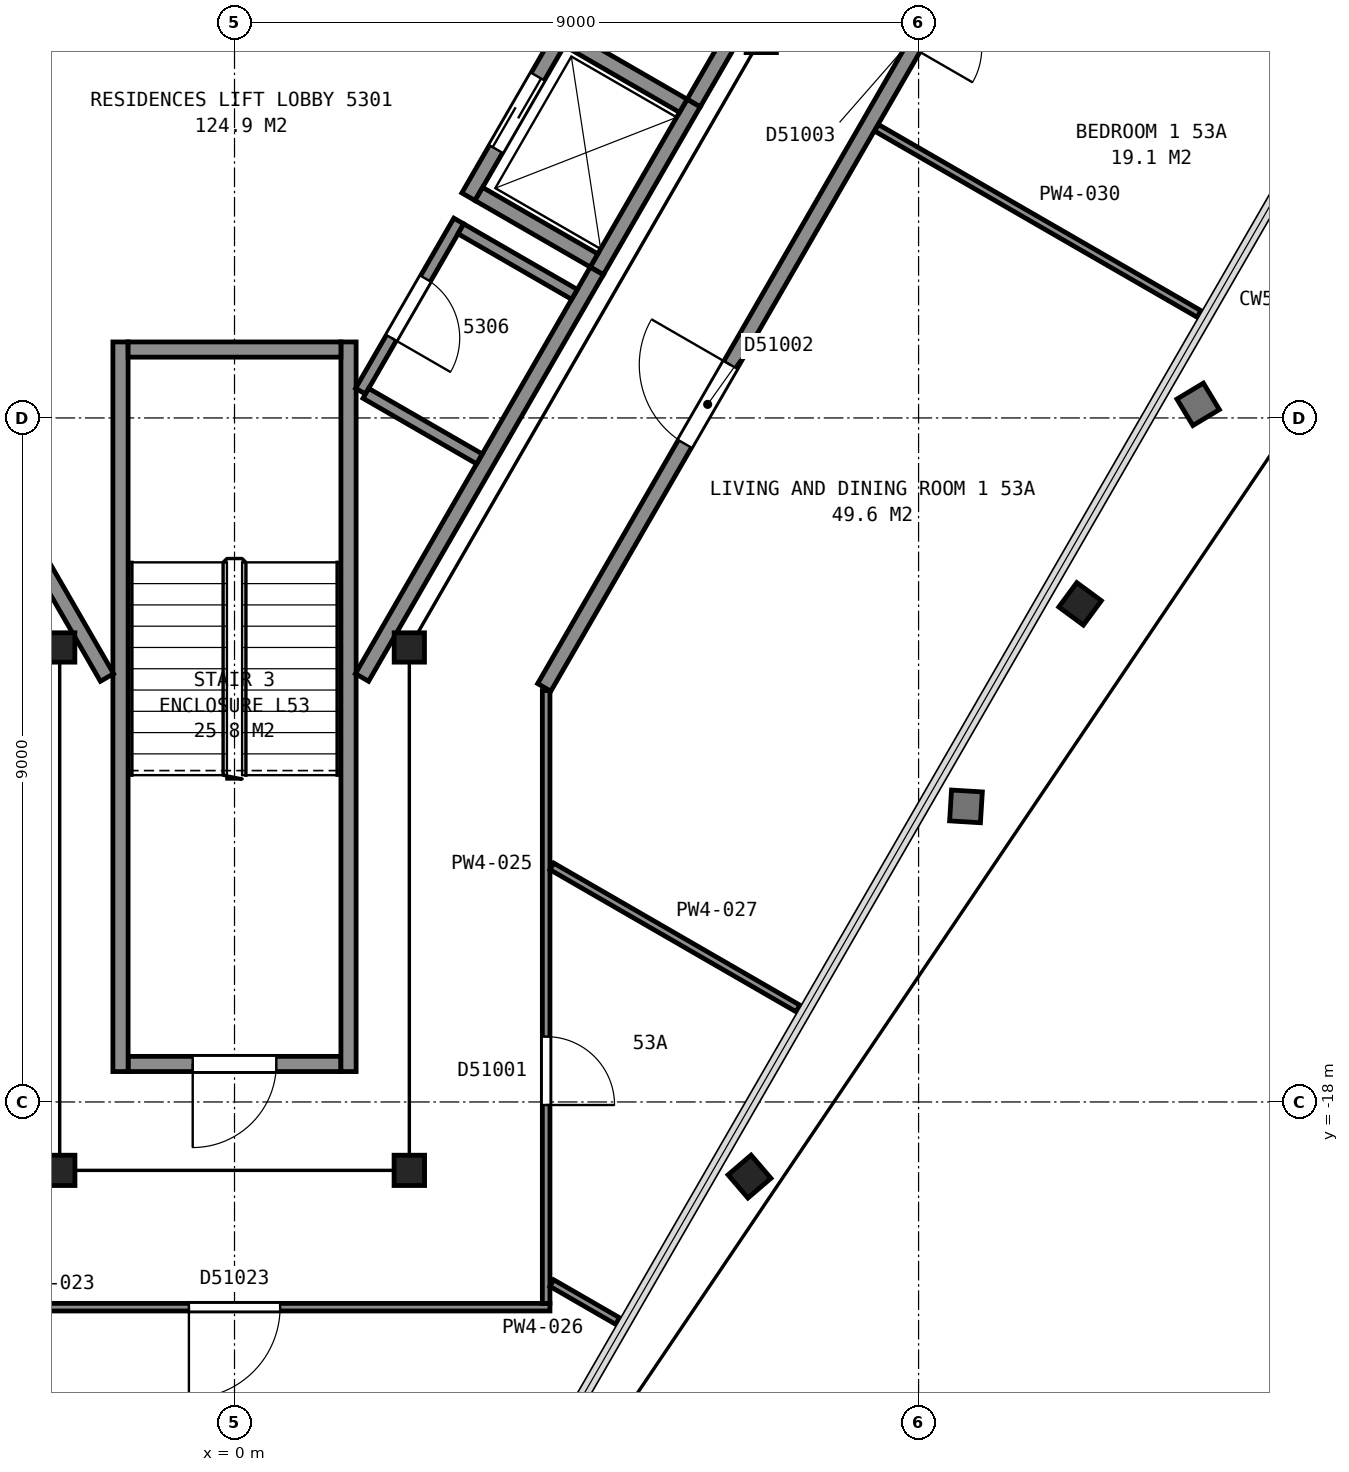
"""IFC4 building model, lengths in metres.
Left out: names, types, materials, properties, quantities, classifications, styles, units other than length and angle.
Written with IfcOpenShell. Run it as: python <this file> out.ifc"""

import sys

from ifc_helpers import new_model, si_unit, direction, frame, frame_2d, origin, origin_2d, place, context, subcontext, project, spatial, rectangle, i_section, extrude, element, fill, save


model = new_model("IFC4")
c1 = context("Model", 3, precision=1e-05, world=origin(), true_north=direction((0.0, 1.0)))
c2 = subcontext(c1, "Body", "Model", "MODEL_VIEW")
j1 = project(units=[si_unit("LENGTHUNIT", "METRE"), si_unit("PLANEANGLEUNIT", "RADIAN")], contexts=[c1])
p1 = place(None, origin())
s1 = spatial("IfcSite", under=j1, at=p1, CompositionType="ELEMENT")
p2 = place(p1, origin())
s2 = spatial("IfcBuilding", under=s1, at=p2, CompositionType="ELEMENT")
p3 = place(p2, frame((0.0, 0.0, 213.8)))
s3 = spatial("IfcBuildingStorey", under=s2, at=p3, CompositionType="ELEMENT", Elevation=213.8)
p4 = place(p3, frame((6.625, -18.805, 0.035), z_axis=(0.127230260559, -0.148402325691, 0.980708524755), x_axis=(-0.498811932541, -0.864189207777, -0.06605807382)))
e1 = element("IfcColumn", 1, at=p4, inside=s3, PredefinedType="COLUMN", context=c2, shape_type="SweptSolid", body=[
    extrude(i_section(OverallWidth=0.401, OverallDepth=0.399, WebThickness=0.025, FlangeThickness=0.04, FilletRadius=0.015, at=origin_2d()), origin(), (0.0, 0.0, 1.0), 3.701),
])
p5 = place(p3, frame((10.945, -11.314, 0.035), z_axis=(0.15133236457, -0.11150110493, 0.982174128672), x_axis=(-0.499861643135, -0.865843891747, -0.021276579787)))
e2 = element("IfcColumn", 2, at=p5, inside=s3, PredefinedType="COLUMN", context=c2, shape_type="SweptSolid", body=[
    extrude(i_section(OverallWidth=0.401, OverallDepth=0.399, WebThickness=0.025, FlangeThickness=0.04, FilletRadius=0.015, at=origin_2d()), origin(), (0.0, 0.0, 1.0), 3.696),
])
p6 = place(p3, frame((-2.3, -12.02, 0.0), z_axis=(0.0, 0.0, 1.0), x_axis=(1.0, 0.0, 0.0)))
e3 = element("IfcColumn", 3, at=p6, inside=s3, PredefinedType="COLUMN", context=c2, shape_type="SweptSolid", body=[
    extrude(i_section(OverallWidth=0.399, OverallDepth=0.386, WebThickness=0.021, FlangeThickness=0.033, FilletRadius=0.015, at=origin_2d()), origin(), (0.0, 0.0, 1.0), 3.7),
])
for number, where, z_axis, x_axis in (
    (4, (-2.3, -18.9, 0.0), (0.0, 0.0, 1.0), (-1.0, 0.0, 0.0)),
    (5, (2.3, -18.9, 0.0), (0.0, 0.0, 1.0), (-1.0, 0.0, 0.0)),
):
    element("IfcColumn", number, at=place(p3, frame(where, z_axis=z_axis, x_axis=x_axis)), inside=s3, PredefinedType="COLUMN", context=c2, shape_type="SweptSolid", body=[
        extrude(i_section(OverallWidth=0.401, OverallDepth=0.399, WebThickness=0.025, FlangeThickness=0.04, FilletRadius=0.015, at=origin_2d()), origin(), (0.0, 0.0, 1.0), 3.7),
    ])
for number, where, z_axis, x_axis in (
    (6, (2.3, -12.02, 0.0), (0.0, 0.0, 1.0), (1.0, 0.0, 0.0)),
    (7, (6.93, -4.0, 0.0), (0.0, 0.0, 1.0), (1.0, 0.0, 0.0)),
):
    element("IfcColumn", number, at=place(p3, frame(where, z_axis=z_axis, x_axis=x_axis)), inside=s3, PredefinedType="COLUMN", context=c2, shape_type="SweptSolid", body=[
        extrude(i_section(OverallWidth=0.399, OverallDepth=0.386, WebThickness=0.021, FlangeThickness=0.033, FilletRadius=0.015, at=origin_2d()), origin(), (0.0, 0.0, 1.0), 3.7),
    ])
p7 = place(p3, frame((-1.4, -17.5, 0.0), z_axis=(0.0, 0.0, 1.0), x_axis=(1.0, 0.0, 0.0)))
e8 = element("IfcWall", 8, at=p7, inside=s3, PredefinedType="PARTITIONING", context=c2, shape_type="SweptSolid", body=[
    extrude(rectangle(XDim=2.8, YDim=0.2, at=frame_2d((1.4, 0.0))), origin(), (0.0, 0.0, 1.0), 3.45),
])
p8 = place(p7, frame((0.85, 0.0, 0.0)))
e9 = element("IfcOpeningElement", 9, at=p8, cuts=e8, PredefinedType="OPENING", context=c2, shape_type="SweptSolid", body=[
    extrude(rectangle(XDim=1.1, YDim=2.1, at=frame_2d((0.55, 1.05))), frame((0.0, 0.11, 0.0), z_axis=(0.0, -1.0, 0.0), x_axis=(1.0, 0.0, 0.0)), (0.0, 0.0, 1.0), 0.22),
])
for number, where, z_axis, x_axis in (
    (10, (1.5, -8.0, 0.0), (0.0, 0.0, 1.0), (0.0, -1.0, 0.0)),
    (11, (-1.5, -8.0, 0.0), (0.0, 0.0, 1.0), (0.0, -1.0, 0.0)),
):
    element("IfcWall", number, at=place(p3, frame(where, z_axis=z_axis, x_axis=x_axis)), inside=s3, PredefinedType="PARTITIONING", context=c2, shape_type="SweptSolid", body=[
        extrude(rectangle(XDim=9.6, YDim=0.2, at=frame_2d((4.8, 0.0))), origin(), (0.0, 0.0, 1.0), 3.45),
    ])
p9 = place(p3, frame((-1.4, -8.1, 0.0), z_axis=(0.0, 0.0, 1.0), x_axis=(1.0, 0.0, 0.0)))
e12 = element("IfcWall", 12, at=p9, inside=s3, PredefinedType="PARTITIONING", context=c2, shape_type="SweptSolid", body=[
    extrude(rectangle(XDim=2.8, YDim=0.2, at=frame_2d((1.4, 0.0))), origin(), (0.0, 0.0, 1.0), 3.45),
])
p10 = place(p3, frame((4.766, -7.065, 0.0), z_axis=(0.0, 0.0, 1.0), x_axis=(0.499948979701, 0.866054858364, 0.0)))
e13 = element("IfcWall", 13, at=p10, inside=s3, PredefinedType="PARTITIONING", context=c2, shape_type="SweptSolid", body=[
    extrude(rectangle(XDim=2.55, YDim=0.2, at=frame_2d((1.275, 0.0))), origin(), (0.0, 0.0, 1.0), 3.7),
])
p11 = place(p3, frame((3.077, -6.09, 0.0), z_axis=(0.0, 0.0, 1.0), x_axis=(0.500062241894, 0.865989465428, 0.0)))
e14 = element("IfcWall", 14, at=p11, inside=s3, PredefinedType="PARTITIONING", context=c2, shape_type="SweptSolid", body=[
    extrude(rectangle(XDim=2.55, YDim=0.2, at=frame_2d((1.275, 0.0))), origin(), (0.0, 0.0, 1.0), 3.7),
])
p12 = place(p11, frame((0.725, 0.0, 0.0)))
e15 = element("IfcOpeningElement", 15, at=p12, cuts=e14, PredefinedType="OPENING", context=c2, shape_type="SweptSolid", body=[
    extrude(rectangle(XDim=1.1, YDim=2.1, at=frame_2d((0.55, 1.05))), frame((0.0, 0.11, 0.0), z_axis=(0.0, -1.0, 0.0), x_axis=(1.0, 0.0, 0.0)), (0.0, 0.0, 1.0), 0.22),
])
p13 = place(p3, frame((5.905, -4.893, 0.0), z_axis=(0.0, 0.0, 1.0), x_axis=(-0.866002029911, 0.500040482552, 0.0)))
e16 = element("IfcWall", 16, at=p13, inside=s3, PredefinedType="PARTITIONING", context=c2, shape_type="SweptSolid", body=[
    extrude(rectangle(XDim=1.75, YDim=0.2, at=frame_2d((0.875, 0.0))), origin(), (0.0, 0.0, 1.0), 3.7),
])
p14 = place(p3, frame((4.73, -6.928, 0.0), z_axis=(0.0, 0.0, 1.0), x_axis=(-0.866036909293, 0.499980071345, 0.0)))
e17 = element("IfcWall", 17, at=p14, inside=s3, PredefinedType="PARTITIONING", context=c2, shape_type="SweptSolid", body=[
    extrude(rectangle(XDim=1.75, YDim=0.2, at=frame_2d((0.875, 0.0))), origin(), (0.0, 0.0, 1.0), 3.7),
])
p15 = place(p3, frame((-4.655, -7.257, 0.0), z_axis=(0.0, 0.0, 1.0), x_axis=(0.499966124405, -0.866044960985, 0.0)))
e18 = element("IfcWall", 18, at=p15, inside=s3, PredefinedType="PARTITIONING", context=c2, shape_type="SweptSolid", body=[
    extrude(rectangle(XDim=5.956, YDim=0.2, at=frame_2d((2.978, 0.0))), origin(), (0.0, 0.0, 1.0), 3.45),
])
p16 = place(p15, frame((0.45, 0.0, 0.0)))
e19 = element("IfcOpeningElement", 19, at=p16, cuts=e18, PredefinedType="OPENING", context=c2, shape_type="SweptSolid", body=[
    extrude(rectangle(XDim=1.8, YDim=2.1, at=frame_2d((0.9, 1.05))), frame((0.0, 0.11, 0.0), z_axis=(0.0, -1.0, 0.0), x_axis=(1.0, 0.0, 0.0)), (0.0, 0.0, 1.0), 0.22),
])
p17 = place(p3, frame((1.677, -12.415, 0.0), z_axis=(0.0, 0.0, 1.0), x_axis=(0.500054337157, 0.865994029939, 0.0)))
e20 = element("IfcWall", 20, at=p17, inside=s3, PredefinedType="PARTITIONING", context=c2, shape_type="SweptSolid", body=[
    extrude(rectangle(XDim=6.177, YDim=0.2, at=frame_2d((3.088, 0.0))), origin(), (0.0, 0.0, 1.0), 3.45),
])
p18 = place(p3, frame((2.95, -6.409, 0.0), z_axis=(0.0, 0.0, 1.0), x_axis=(-0.499978610854, -0.866037752461, 0.0)))
e21 = element("IfcWall", 21, at=p18, inside=s3, PredefinedType="PARTITIONING", context=c2, shape_type="SweptSolid", body=[
    extrude(rectangle(XDim=2.585, YDim=0.15, at=frame_2d((1.292, 0.0))), origin(), (0.0, 0.0, 1.0), 3.45),
])
p19 = place(p18, frame((0.875, 0.0, 0.0)))
e22 = element("IfcOpeningElement", 22, at=p19, cuts=e21, PredefinedType="OPENING", context=c2, shape_type="SweptSolid", body=[
    extrude(rectangle(XDim=0.9, YDim=2.1, at=frame_2d((0.45, 1.05))), frame((0.0, 0.085, 0.0), z_axis=(0.0, -1.0, 0.0), x_axis=(1.0, 0.0, 0.0)), (0.0, 0.0, 1.0), 0.17),
])
for number, where, z_axis, x_axis in (
    (23, (1.728, -8.677, 0.0), (0.0, 0.0, 1.0), (0.866, -0.5, 0.0)),
    (24, (2.978, -6.511, 0.0), (0.0, 0.0, 1.0), (0.866, -0.5, 0.0)),
):
    element("IfcWall", number, at=place(p3, frame(where, z_axis=z_axis, x_axis=x_axis)), inside=s3, PredefinedType="PARTITIONING", context=c2, shape_type="SweptSolid", body=[
        extrude(rectangle(XDim=1.725, YDim=0.15, at=frame_2d((0.863, 0.0))), origin(), (0.0, 0.0, 1.0), 3.45),
    ])
p20 = place(p3, frame((6.042, -4.855, 0.0), z_axis=(0.0, 0.0, 1.0), x_axis=(0.500252727967, 0.865879442048, 0.0)))
e25 = element("IfcWall", 25, at=p20, inside=s3, PredefinedType="PARTITIONING", context=c2, shape_type="SweptSolid", body=[
    extrude(rectangle(XDim=2.617, YDim=0.2, at=frame_2d((1.309, 0.0))), origin(), (0.0, 0.0, 1.0), 3.45),
])
p21 = place(p3, frame((4.15, -20.7, 0.0), z_axis=(0.0, 0.0, 1.0), x_axis=(-1.0, 0.0, 0.0)))
e26 = element("IfcWall", 26, at=p21, inside=s3, PredefinedType="PARTITIONING", context=c2, shape_type="SweptSolid", body=[
    extrude(rectangle(XDim=8.3, YDim=0.1, at=frame_2d((4.15, 0.0))), origin(), (0.0, 0.0, 1.0), 2.713),
])
p22 = place(p21, frame((3.55, 0.0, 0.0)))
e27 = element("IfcOpeningElement", 27, at=p22, cuts=e26, PredefinedType="OPENING", context=c2, shape_type="SweptSolid", body=[
    extrude(rectangle(XDim=1.2, YDim=2.1, at=frame_2d((0.6, 1.05))), frame((0.0, 0.06, 0.0), z_axis=(0.0, -1.0, 0.0), x_axis=(1.0, 0.0, 0.0)), (0.0, 0.0, 1.0), 0.12),
])
p23 = place(p3, frame((4.1, -12.587, 0.0), z_axis=(0.0, 0.0, 1.0), x_axis=(0.0, -1.0, 0.0)))
e28 = element("IfcWall", 28, at=p23, inside=s3, PredefinedType="PARTITIONING", context=c2, shape_type="SweptSolid", body=[
    extrude(rectangle(XDim=8.063, YDim=0.1, at=frame_2d((4.031, 0.0))), origin(), (0.0, 0.0, 1.0), 2.713),
])
p24 = place(p23, frame((4.553, 0.0, 0.0)))
e29 = element("IfcOpeningElement", 29, at=p24, cuts=e28, PredefinedType="OPENING", context=c2, shape_type="SweptSolid", body=[
    extrude(rectangle(XDim=0.9, YDim=2.1, at=frame_2d((0.45, 1.05))), frame((0.0, 0.06, 0.0), z_axis=(0.0, -1.0, 0.0), x_axis=(1.0, 0.0, 0.0)), (0.0, 0.0, 1.0), 0.12),
])
p25 = place(p3, frame((4.175, -20.383, 0.0), z_axis=(0.0, 0.0, 1.0), x_axis=(0.866234439787, -0.499637764112, 0.0)))
e30 = element("IfcWall", 30, at=p25, inside=s3, PredefinedType="PARTITIONING", context=c2, shape_type="SweptSolid", body=[
    extrude(rectangle(XDim=0.998, YDim=0.1, at=frame_2d((0.499, 0.0))), origin(), (0.0, 0.0, 1.0), 2.713),
])
p26 = place(p3, frame((4.175, -14.9, 0.0), z_axis=(0.0, 0.0, 1.0), x_axis=(0.866057308191, -0.499944735875, 0.0)))
e31 = element("IfcWall", 31, at=p26, inside=s3, PredefinedType="PARTITIONING", context=c2, shape_type="SweptSolid", body=[
    extrude(rectangle(XDim=3.74, YDim=0.1, at=frame_2d((1.87, 0.0))), origin(), (0.0, 0.0, 1.0), 2.713),
])
p27 = place(p3, frame((12.903, 2.745, 0.0), z_axis=(0.0, 0.0, 1.0), x_axis=(-0.499999743747, -0.866025551732, 0.0)))
e32 = element("IfcWall", 32, at=p27, inside=s3, PredefinedType="PARTITIONING", context=c2, shape_type="SweptSolid", body=[
    extrude(rectangle(XDim=17.656, YDim=0.2, at=frame_2d((8.828, 0.0))), origin(), (0.0, 0.0, 1.0), 2.713),
])
p28 = place(p27, frame((12.756, 0.0, 0.0)))
e33 = element("IfcOpeningElement", 33, at=p28, cuts=e32, PredefinedType="OPENING", context=c2, shape_type="SweptSolid", body=[
    extrude(rectangle(XDim=1.2, YDim=2.1, at=frame_2d((0.6, 1.05))), frame((0.0, 0.11, 0.0), z_axis=(0.0, -1.0, 0.0), x_axis=(1.0, 0.0, 0.0)), (0.0, 0.0, 1.0), 0.22),
])
p29 = place(p27, frame((7.044, 0.0, 0.0)))
e34 = element("IfcOpeningElement", 34, at=p29, cuts=e32, PredefinedType="OPENING", context=c2, shape_type="SweptSolid", body=[
    extrude(rectangle(XDim=0.9, YDim=2.1, at=frame_2d((0.45, 1.05))), frame((0.0, 0.11, 0.0), z_axis=(0.0, -1.0, 0.0), x_axis=(1.0, 0.0, 0.0)), (0.0, 0.0, 1.0), 0.22),
])
p30 = place(p27, frame((0.417, 0.0, 0.0)))
e35 = element("IfcOpeningElement", 35, at=p30, cuts=e32, PredefinedType="OPENING", context=c2, shape_type="SweptSolid", body=[
    extrude(rectangle(XDim=0.9, YDim=2.1, at=frame_2d((0.45, 1.05))), frame((0.0, 0.11, 0.0), z_axis=(0.0, -1.0, 0.0), x_axis=(1.0, 0.0, 0.0)), (0.0, 0.0, 1.0), 0.22),
])
p31 = place(p3, frame((8.447, -5.182, 0.0), z_axis=(0.0, 0.0, 1.0), x_axis=(0.866106755222, -0.499859068697, 0.0)))
e36 = element("IfcWall", 36, at=p31, inside=s3, PredefinedType="PARTITIONING", context=c2, shape_type="SweptSolid", body=[
    extrude(rectangle(XDim=4.899, YDim=0.1, at=frame_2d((2.449, 0.0))), origin(), (0.0, 0.0, 1.0), 2.713),
])
p32 = place(p8, origin())
e37 = element("IfcDoor", 37, at=p32, inside=s3, OperationType="SINGLE_SWING_LEFT", PredefinedType="DOOR", context=c2, shape_type="SweptSolid", body=[
    extrude(rectangle(XDim=1.1, YDim=2.1, at=frame_2d((0.55, 1.05))), frame((0.0, 0.025, 0.0), z_axis=(0.0, -1.0, 0.0), x_axis=(1.0, 0.0, 0.0)), (0.0, 0.0, 1.0), 0.05),
])
fill(e9, e37)
p33 = place(p12, origin())
e38 = element("IfcDoor", 38, at=p33, inside=s3, OperationType="SLIDING_TO_LEFT", PredefinedType="DOOR", context=c2, shape_type="SweptSolid", body=[
    extrude(rectangle(XDim=1.1, YDim=2.1, at=frame_2d((0.55, 1.05))), frame((0.0, 0.025, 0.0), z_axis=(0.0, -1.0, 0.0), x_axis=(1.0, 0.0, 0.0)), (0.0, 0.0, 1.0), 0.05),
])
fill(e15, e38)
p34 = place(p19, origin())
e39 = element("IfcDoor", 39, at=p34, inside=s3, OperationType="SINGLE_SWING_RIGHT", PredefinedType="DOOR", context=c2, shape_type="SweptSolid", body=[
    extrude(rectangle(XDim=0.9, YDim=2.1, at=frame_2d((0.45, 1.05))), frame((0.0, 0.025, 0.0), z_axis=(0.0, -1.0, 0.0), x_axis=(1.0, 0.0, 0.0)), (0.0, 0.0, 1.0), 0.05),
])
fill(e22, e39)
p35 = place(p22, origin())
e40 = element("IfcDoor", 40, at=p35, inside=s3, OperationType="SINGLE_SWING_RIGHT", PredefinedType="DOOR", context=c2, shape_type="SweptSolid", body=[
    extrude(rectangle(XDim=1.2, YDim=2.1, at=frame_2d((0.6, 1.05))), frame((0.0, 0.025, 0.0), z_axis=(0.0, -1.0, 0.0), x_axis=(1.0, 0.0, 0.0)), (0.0, 0.0, 1.0), 0.05),
])
fill(e27, e40)
p36 = place(p24, origin())
e41 = element("IfcDoor", 41, at=p36, inside=s3, OperationType="SINGLE_SWING_RIGHT", PredefinedType="DOOR", context=c2, shape_type="SweptSolid", body=[
    extrude(rectangle(XDim=0.9, YDim=2.1, at=frame_2d((0.45, 1.05))), frame((0.0, 0.025, 0.0), z_axis=(0.0, -1.0, 0.0), x_axis=(1.0, 0.0, 0.0)), (0.0, 0.0, 1.0), 0.05),
])
fill(e29, e41)
p37 = place(p28, origin())
e42 = element("IfcDoor", 42, at=p37, inside=s3, OperationType="SINGLE_SWING_LEFT", PredefinedType="DOOR", context=c2, shape_type="SweptSolid", body=[
    extrude(rectangle(XDim=1.2, YDim=2.1, at=frame_2d((0.6, 1.05))), frame((0.0, 0.025, 0.0), z_axis=(0.0, -1.0, 0.0), x_axis=(1.0, 0.0, 0.0)), (0.0, 0.0, 1.0), 0.05),
])
fill(e33, e42)
save(model, sys.argv[1])
